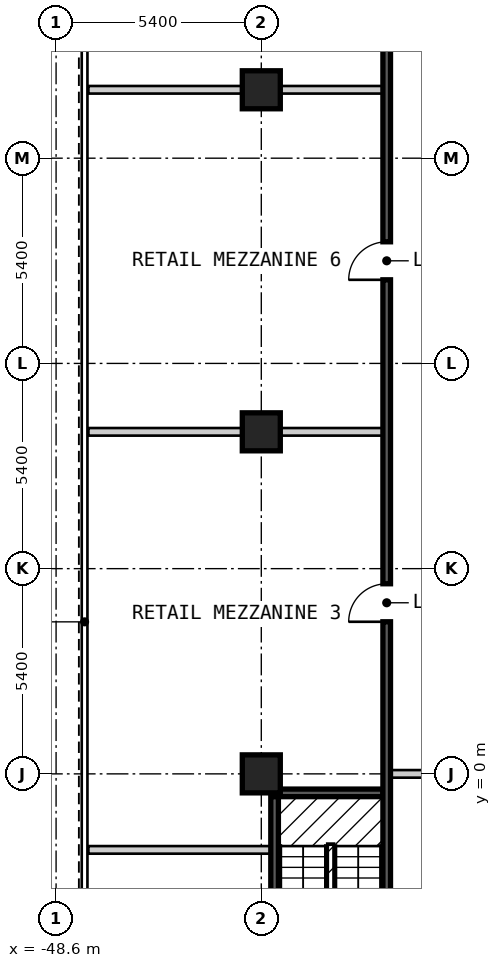
"""IFC4 building model, lengths in metres.
Left out: names, types, materials, properties, quantities, classifications, styles, units other than length and angle.
Written with IfcOpenShell. Run it as: python <this file> out.ifc"""

import sys

from ifc_helpers import new_model, si_unit, direction, frame, frame_2d, origin, origin_2d, place, context, subcontext, project, spatial, rectangle, extrude, element, fill, save


model = new_model("IFC4")
c1 = context("Model", 3, precision=1e-05, world=origin(), true_north=direction((0.0, 1.0)))
c2 = subcontext(c1, "Body", "Model", "MODEL_VIEW")
j1 = project(units=[si_unit("LENGTHUNIT", "METRE"), si_unit("PLANEANGLEUNIT", "RADIAN")], contexts=[c1])
p1 = place(None, origin())
s1 = spatial("IfcSite", under=j1, at=p1, CompositionType="ELEMENT")
p2 = place(p1, origin())
s2 = spatial("IfcBuilding", under=s1, at=p2, CompositionType="ELEMENT")
p3 = place(p2, frame((0.0, 0.0, 5.0)))
s3 = spatial("IfcBuildingStorey", under=s2, at=p3, CompositionType="ELEMENT", Elevation=5.0)
for number, where, z_axis, x_axis in (
    (1, (-43.2, 0.0, 0.0), (0.0, 0.0, 1.0), (1.0, 0.0, 0.0)),
    (2, (-43.2, 9.0, 0.0), (0.0, 0.0, 1.0), (1.0, 0.0, 0.0)),
    (3, (-43.2, 18.0, 0.0), (0.0, 0.0, 1.0), (1.0, 0.0, 0.0)),
):
    element("IfcColumn", number, at=place(p3, frame(where, z_axis=z_axis, x_axis=x_axis)), inside=s3, PredefinedType="COLUMN", context=c2, shape_type="SweptSolid", body=[
        extrude(rectangle(XDim=1.0, YDim=1.0, at=origin_2d()), origin(), (0.0, 0.0, 1.0), 4.0),
    ])
p4 = place(p3, frame((-47.75, -2.0, 0.0), z_axis=(0.0, 0.0, 1.0), x_axis=(1.0, 0.0, 0.0)))
e4 = element("IfcWall", 4, at=p4, inside=s3, PredefinedType="PARTITIONING", context=c2, shape_type="SweptSolid", body=[
    extrude(rectangle(XDim=5.0, YDim=0.2, at=frame_2d((2.5, 0.0))), origin(), (0.0, 0.0, 1.0), 3.5),
])
p5 = place(p3, frame((-42.85, -0.5, 0.0), z_axis=(0.0, 0.0, 1.0), x_axis=(1.0, 0.0, 0.0)))
e5 = element("IfcWall", 5, at=p5, inside=s3, PredefinedType="SOLIDWALL", context=c2, shape_type="SweptSolid", body=[
    extrude(rectangle(XDim=2.85, YDim=0.2, at=frame_2d((1.425, 0.0))), origin(), (0.0, 0.0, 1.0), 3.5),
])
p6 = place(p3, frame((-40.0, 0.0, 0.0), z_axis=(0.0, 0.0, 1.0), x_axis=(1.0, 0.0, 0.0)))
e6 = element("IfcWall", 6, at=p6, inside=s3, PredefinedType="PARTITIONING", context=c2, shape_type="SweptSolid", body=[
    extrude(rectangle(XDim=9.851, YDim=0.2, at=frame_2d((4.926, 0.0))), origin(), (0.0, 0.0, 1.0), 3.5),
])
p7 = place(p6, frame((2.902, 0.0, 0.0)))
e7 = element("IfcOpeningElement", 7, at=p7, cuts=e6, PredefinedType="OPENING", context=c2, shape_type="SweptSolid", body=[
    extrude(rectangle(XDim=1.8, YDim=2.1, at=frame_2d((0.9, 1.05))), frame((0.0, 0.11, 0.0), z_axis=(0.0, -1.0, 0.0), x_axis=(1.0, 0.0, 0.0)), (0.0, 0.0, 1.0), 0.22),
])
for number, where, z_axis, x_axis in (
    (8, (-47.75, 9.0, 0.0), (0.0, 0.0, 1.0), (1.0, 0.0, 0.0)),
    (9, (-47.75, 18.0, 0.0), (0.0, 0.0, 1.0), (1.0, 0.0, 0.0)),
):
    element("IfcWall", number, at=place(p3, frame(where, z_axis=z_axis, x_axis=x_axis)), inside=s3, PredefinedType="PARTITIONING", context=c2, shape_type="SweptSolid", body=[
        extrude(rectangle(XDim=7.75, YDim=0.2, at=frame_2d((3.875, 0.0))), origin(), (0.0, 0.0, 1.0), 3.5),
    ])
p8 = place(p3, frame((-42.85, -6.0, 0.0), z_axis=(0.0, 0.0, 1.0), x_axis=(0.0, 1.0, 0.0)))
e10 = element("IfcWall", 10, at=p8, inside=s3, PredefinedType="SOLIDWALL", context=c2, shape_type="SweptSolid", body=[
    extrude(rectangle(XDim=5.4, YDim=0.2, at=frame_2d((2.7, 0.0))), origin(), (0.0, 0.0, 1.0), 3.5),
])
p9 = place(p3, frame((-39.9, -6.3, 0.0), z_axis=(0.0, 0.0, 1.0), x_axis=(0.0, 1.0, 0.0)))
e11 = element("IfcWall", 11, at=p9, inside=s3, PredefinedType="SOLIDWALL", context=c2, shape_type="SweptSolid", body=[
    extrude(rectangle(XDim=33.3, YDim=0.2, at=frame_2d((16.65, 0.0))), origin(), (0.0, 0.0, 1.0), 3.5),
])
p10 = place(p9, frame((10.302, 0.0, 0.0)))
e12 = element("IfcOpeningElement", 12, at=p10, cuts=e11, PredefinedType="OPENING", context=c2, shape_type="SweptSolid", body=[
    extrude(rectangle(XDim=1.0, YDim=2.1, at=frame_2d((0.5, 1.05))), frame((0.0, 0.11, 0.0), z_axis=(0.0, -1.0, 0.0), x_axis=(1.0, 0.0, 0.0)), (0.0, 0.0, 1.0), 0.22),
])
p11 = place(p9, frame((28.298, 0.0, 0.0)))
e13 = element("IfcOpeningElement", 13, at=p11, cuts=e11, PredefinedType="OPENING", context=c2, shape_type="SweptSolid", body=[
    extrude(rectangle(XDim=1.0, YDim=2.1, at=frame_2d((0.5, 1.05))), frame((0.0, 0.11, 0.0), z_axis=(0.0, -1.0, 0.0), x_axis=(1.0, 0.0, 0.0)), (0.0, 0.0, 1.0), 0.22),
])
p12 = place(p9, frame((19.3, 0.0, 0.0)))
e14 = element("IfcOpeningElement", 14, at=p12, cuts=e11, PredefinedType="OPENING", context=c2, shape_type="SweptSolid", body=[
    extrude(rectangle(XDim=1.0, YDim=2.1, at=frame_2d((0.5, 1.05))), frame((0.0, 0.11, 0.0), z_axis=(0.0, -1.0, 0.0), x_axis=(1.0, 0.0, 0.0)), (0.0, 0.0, 1.0), 0.22),
])
p13 = place(p9, frame((0.45, 0.0, 0.0)))
e15 = element("IfcOpeningElement", 15, at=p13, cuts=e11, PredefinedType="OPENING", context=c2, shape_type="SweptSolid", body=[
    extrude(rectangle(XDim=1.0, YDim=2.1, at=frame_2d((0.5, 1.05))), frame((0.0, 0.11, 0.0), z_axis=(0.0, -1.0, 0.0), x_axis=(1.0, 0.0, 0.0)), (0.0, 0.0, 1.0), 0.22),
])
p14 = place(p10, origin())
e16 = element("IfcDoor", 16, at=p14, inside=s3, OperationType="SINGLE_SWING_LEFT", PredefinedType="DOOR", context=c2, shape_type="SweptSolid", body=[
    extrude(rectangle(XDim=1.0, YDim=2.1, at=frame_2d((0.5, 1.05))), frame((0.0, 0.025, 0.0), z_axis=(0.0, -1.0, 0.0), x_axis=(1.0, 0.0, 0.0)), (0.0, 0.0, 1.0), 0.05),
])
fill(e12, e16)
p15 = place(p12, origin())
e17 = element("IfcDoor", 17, at=p15, inside=s3, OperationType="SINGLE_SWING_LEFT", PredefinedType="DOOR", context=c2, shape_type="SweptSolid", body=[
    extrude(rectangle(XDim=1.0, YDim=2.1, at=frame_2d((0.5, 1.05))), frame((0.0, 0.025, 0.0), z_axis=(0.0, -1.0, 0.0), x_axis=(1.0, 0.0, 0.0)), (0.0, 0.0, 1.0), 0.05),
])
fill(e14, e17)
save(model, sys.argv[1])
